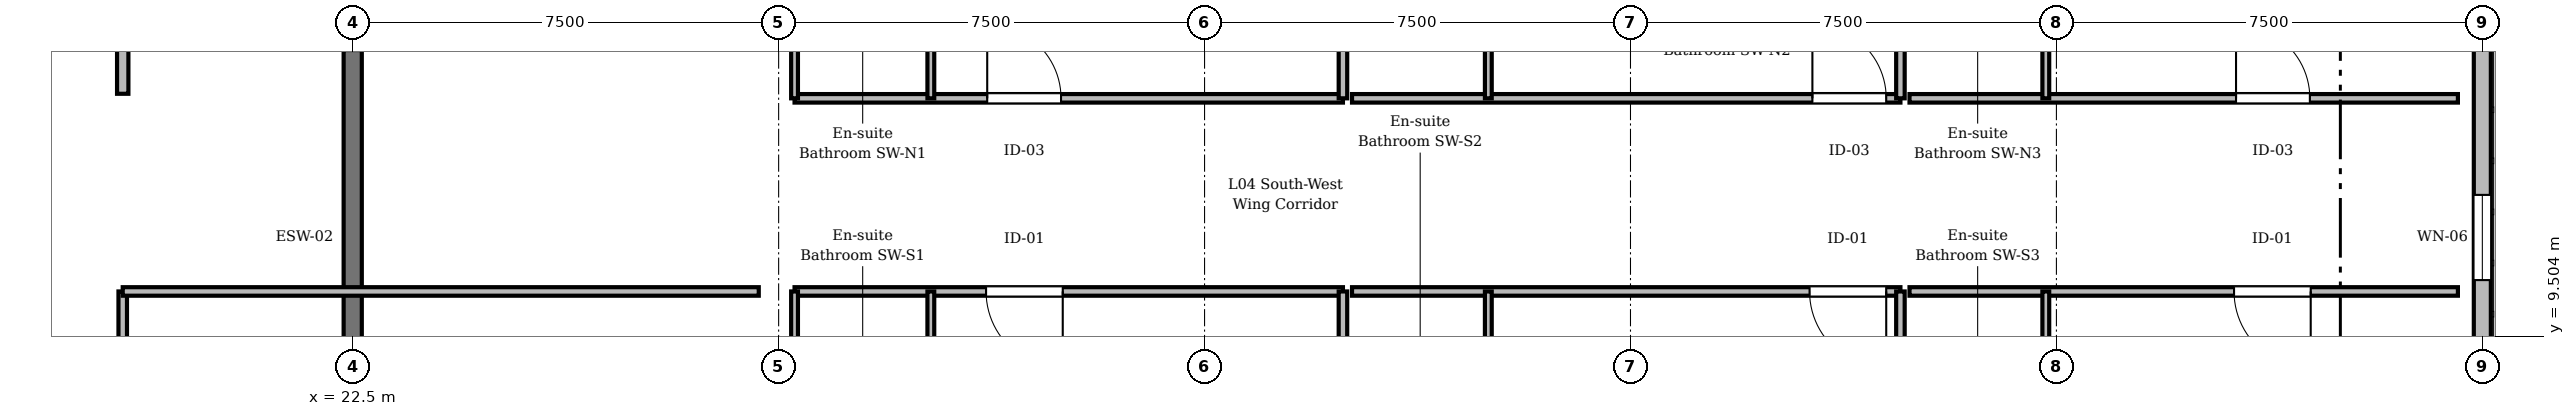
"""IFC4 building model, lengths in metres.
Left out: names, types, materials, properties, quantities, classifications, styles, units other than length and angle.
Written with IfcOpenShell. Run it as: python <this file> out.ifc"""

import sys

from ifc_helpers import new_model, si_unit, direction, frame, frame_2d, origin, place, context, subcontext, project, spatial, rectangle, extrude, element, fill, save


model = new_model("IFC4")
c1 = context("Model", 3, precision=1e-05, world=origin(), true_north=direction((0.0, 1.0)))
c2 = subcontext(c1, "Body", "Model", "MODEL_VIEW")
j1 = project(units=[si_unit("LENGTHUNIT", "METRE"), si_unit("PLANEANGLEUNIT", "RADIAN")], contexts=[c1])
p1 = place(None, origin())
s1 = spatial("IfcSite", under=j1, at=p1, CompositionType="ELEMENT")
p2 = place(p1, origin())
s2 = spatial("IfcBuilding", under=s1, at=p2, CompositionType="ELEMENT")
p3 = place(p2, frame((0.0, 0.0, 17.85)))
s3 = spatial("IfcBuildingStorey", under=s2, at=p3, CompositionType="ELEMENT", Elevation=17.85)
p4 = place(p3, frame((22.5, 7.95, 0.0), z_axis=(0.0, 0.0, 1.0), x_axis=(0.0, 1.0, 0.0)))
e1 = element("IfcWall", 1, at=p4, inside=s3, PredefinedType="SHEAR", context=c2, shape_type="SweptSolid", body=[
    extrude(rectangle(XDim=6.6, YDim=0.32, at=frame_2d((3.3, 0.0))), origin(), (0.0, 0.0, 1.0), 3.22),
])
p5 = place(p3, frame((60.0, 14.765, 0.0), z_axis=(0.0, 0.0, 1.0), x_axis=(0.0, -1.0, 0.0)))
e2 = element("IfcWall", 2, at=p5, inside=s3, PredefinedType="STANDARD", context=c2, shape_type="SweptSolid", body=[
    extrude(rectangle(XDim=7.03, YDim=0.3, at=frame_2d((3.515, 0.0))), origin(), (0.0, 0.0, 1.0), 3.17),
])
p6 = place(p5, frame((2.765, 0.0, 0.9)))
e3 = element("IfcOpeningElement", 3, at=p6, cuts=e2, PredefinedType="OPENING", context=c2, shape_type="SweptSolid", body=[
    extrude(rectangle(XDim=1.5, YDim=1.99, at=frame_2d((0.75, 0.995))), frame((0.0, 0.16, 0.0), z_axis=(0.0, -1.0, 0.0), x_axis=(1.0, 0.0, 0.0)), (0.0, 0.0, 1.0), 0.32),
])
p7 = place(p3, frame((18.45, 10.3, 0.0), z_axis=(0.0, 0.0, 1.0), x_axis=(0.0, -1.0, 0.0)))
e4 = element("IfcWall", 4, at=p7, inside=s3, PredefinedType="PARTITIONING", context=c2, shape_type="SweptSolid", body=[
    extrude(rectangle(XDim=9.95, YDim=0.15, at=frame_2d((4.975, 0.0))), origin(), (0.0, 0.0, 1.0), 3.755),
])
p8 = place(p7, frame((5.92, 0.0, 0.0)))
e5 = element("IfcOpeningElement", 5, at=p8, cuts=e4, PredefinedType="OPENING", context=c2, shape_type="SweptSolid", body=[
    extrude(rectangle(XDim=1.35, YDim=2.25, at=frame_2d((0.675, 1.125))), frame((0.0, 0.085, 0.0), z_axis=(0.0, -1.0, 0.0), x_axis=(1.0, 0.0, 0.0)), (0.0, 0.0, 1.0), 0.17),
])
p9 = place(p3, frame((18.45, 20.797, 0.0), z_axis=(0.0, 0.0, 1.0), x_axis=(0.0, -1.0, 0.0)))
e6 = element("IfcWall", 6, at=p9, inside=s3, PredefinedType="STANDARD", context=c2, shape_type="SweptSolid", body=[
    extrude(rectangle(XDim=7.017, YDim=0.2, at=frame_2d((3.509, 0.0))), origin(), (0.0, 0.0, 1.0), 3.755),
])
p10 = place(p9, frame((1.323, 0.0, 0.0)))
e7 = element("IfcOpeningElement", 7, at=p10, cuts=e6, PredefinedType="OPENING", context=c2, shape_type="SweptSolid", body=[
    extrude(rectangle(XDim=1.15, YDim=2.2, at=frame_2d((0.575, 1.1))), frame((0.0, 0.11, 0.0), z_axis=(0.0, -1.0, 0.0), x_axis=(1.0, 0.0, 0.0)), (0.0, 0.0, 1.0), 0.22),
])
p11 = place(p3, frame((39.937, 10.3, 0.0), z_axis=(0.0, 0.0, 1.0), x_axis=(-1.0, 0.0, 0.0)))
e8 = element("IfcWall", 8, at=p11, inside=s3, PredefinedType="PARTITIONING", context=c2, shape_type="SweptSolid", body=[
    extrude(rectangle(XDim=9.657, YDim=0.15, at=frame_2d((4.828, 0.0))), origin(), (0.0, 0.0, 1.0), 3.755),
])
p12 = place(p11, frame((4.934, 0.0, 0.0)))
e9 = element("IfcOpeningElement", 9, at=p12, cuts=e8, PredefinedType="OPENING", context=c2, shape_type="SweptSolid", body=[
    extrude(rectangle(XDim=1.35, YDim=2.25, at=frame_2d((0.675, 1.125))), frame((0.0, 0.085, 0.0), z_axis=(0.0, -1.0, 0.0), x_axis=(1.0, 0.0, 0.0)), (0.0, 0.0, 1.0), 0.17),
])
p13 = place(p3, frame((32.68, 8.3, 0.0), z_axis=(0.0, 0.0, 1.0), x_axis=(0.0, 1.0, 0.0)))
e10 = element("IfcWall", 10, at=p13, inside=s3, PredefinedType="PARTITIONING", context=c2, shape_type="SweptSolid", body=[
    extrude(rectangle(XDim=2.0, YDim=0.12, at=frame_2d((1.0, 0.0))), origin(), (0.0, 0.0, 1.0), 3.755),
])
p14 = place(p3, frame((30.28, 13.7, 0.0), z_axis=(0.0, 0.0, 1.0), x_axis=(1.0, 0.0, 0.0)))
e11 = element("IfcWall", 11, at=p14, inside=s3, PredefinedType="PARTITIONING", context=c2, shape_type="SweptSolid", body=[
    extrude(rectangle(XDim=9.657, YDim=0.15, at=frame_2d((4.828, 0.0))), origin(), (0.0, 0.0, 1.0), 3.755),
])
p15 = place(p14, frame((3.393, 0.0, 0.0)))
e12 = element("IfcOpeningElement", 12, at=p15, cuts=e11, PredefinedType="OPENING", context=c2, shape_type="SweptSolid", body=[
    extrude(rectangle(XDim=1.3, YDim=2.2, at=frame_2d((0.65, 1.1))), frame((0.0, 0.085, 0.0), z_axis=(0.0, -1.0, 0.0), x_axis=(1.0, 0.0, 0.0)), (0.0, 0.0, 1.0), 0.17),
])
p16 = place(p3, frame((32.68, 13.7, 0.0), z_axis=(0.0, 0.0, 1.0), x_axis=(0.0, 1.0, 0.0)))
e13 = element("IfcWall", 13, at=p16, inside=s3, PredefinedType="PARTITIONING", context=c2, shape_type="SweptSolid", body=[
    extrude(rectangle(XDim=2.0, YDim=0.12, at=frame_2d((1.0, 0.0))), origin(), (0.0, 0.0, 1.0), 3.755),
])
p17 = place(p3, frame((49.753, 10.3, 0.0), z_axis=(0.0, 0.0, 1.0), x_axis=(-1.0, 0.0, 0.0)))
e14 = element("IfcWall", 14, at=p17, inside=s3, PredefinedType="PARTITIONING", context=c2, shape_type="SweptSolid", body=[
    extrude(rectangle(XDim=9.657, YDim=0.15, at=frame_2d((4.828, 0.0))), origin(), (0.0, 0.0, 1.0), 3.755),
])
p18 = place(p17, frame((0.25, 0.0, 0.0)))
e15 = element("IfcOpeningElement", 15, at=p18, cuts=e14, PredefinedType="OPENING", context=c2, shape_type="SweptSolid", body=[
    extrude(rectangle(XDim=1.35, YDim=2.25, at=frame_2d((0.675, 1.125))), frame((0.0, 0.085, 0.0), z_axis=(0.0, -1.0, 0.0), x_axis=(1.0, 0.0, 0.0)), (0.0, 0.0, 1.0), 0.17),
])
p19 = place(p3, frame((42.497, 8.3, 0.0), z_axis=(0.0, 0.0, 1.0), x_axis=(0.0, 1.0, 0.0)))
e16 = element("IfcWall", 16, at=p19, inside=s3, PredefinedType="PARTITIONING", context=c2, shape_type="SweptSolid", body=[
    extrude(rectangle(XDim=2.0, YDim=0.12, at=frame_2d((1.0, 0.0))), origin(), (0.0, 0.0, 1.0), 3.755),
])
p20 = place(p3, frame((40.097, 13.7, 0.0), z_axis=(0.0, 0.0, 1.0), x_axis=(1.0, 0.0, 0.0)))
e17 = element("IfcWall", 17, at=p20, inside=s3, PredefinedType="PARTITIONING", context=c2, shape_type="SweptSolid", body=[
    extrude(rectangle(XDim=9.657, YDim=0.15, at=frame_2d((4.828, 0.0))), origin(), (0.0, 0.0, 1.0), 3.755),
])
p21 = place(p20, frame((8.107, 0.0, 0.0)))
e18 = element("IfcOpeningElement", 18, at=p21, cuts=e17, PredefinedType="OPENING", context=c2, shape_type="SweptSolid", body=[
    extrude(rectangle(XDim=1.3, YDim=2.2, at=frame_2d((0.65, 1.1))), frame((0.0, 0.085, 0.0), z_axis=(0.0, -1.0, 0.0), x_axis=(1.0, 0.0, 0.0)), (0.0, 0.0, 1.0), 0.17),
])
p22 = place(p3, frame((42.497, 13.7, 0.0), z_axis=(0.0, 0.0, 1.0), x_axis=(0.0, 1.0, 0.0)))
e19 = element("IfcWall", 19, at=p22, inside=s3, PredefinedType="PARTITIONING", context=c2, shape_type="SweptSolid", body=[
    extrude(rectangle(XDim=2.0, YDim=0.12, at=frame_2d((1.0, 0.0))), origin(), (0.0, 0.0, 1.0), 3.755),
])
p23 = place(p3, frame((59.57, 10.3, 0.0), z_axis=(0.0, 0.0, 1.0), x_axis=(-1.0, 0.0, 0.0)))
e20 = element("IfcWall", 20, at=p23, inside=s3, PredefinedType="PARTITIONING", context=c2, shape_type="SweptSolid", body=[
    extrude(rectangle(XDim=9.657, YDim=0.15, at=frame_2d((4.828, 0.0))), origin(), (0.0, 0.0, 1.0), 3.755),
])
p24 = place(p23, frame((2.592, 0.0, 0.0)))
e21 = element("IfcOpeningElement", 21, at=p24, cuts=e20, PredefinedType="OPENING", context=c2, shape_type="SweptSolid", body=[
    extrude(rectangle(XDim=1.35, YDim=2.25, at=frame_2d((0.675, 1.125))), frame((0.0, 0.085, 0.0), z_axis=(0.0, -1.0, 0.0), x_axis=(1.0, 0.0, 0.0)), (0.0, 0.0, 1.0), 0.17),
])
p25 = place(p3, frame((52.313, 8.3, 0.0), z_axis=(0.0, 0.0, 1.0), x_axis=(0.0, 1.0, 0.0)))
e22 = element("IfcWall", 22, at=p25, inside=s3, PredefinedType="PARTITIONING", context=c2, shape_type="SweptSolid", body=[
    extrude(rectangle(XDim=2.0, YDim=0.12, at=frame_2d((1.0, 0.0))), origin(), (0.0, 0.0, 1.0), 3.205),
])
p26 = place(p3, frame((49.913, 13.7, 0.0), z_axis=(0.0, 0.0, 1.0), x_axis=(1.0, 0.0, 0.0)))
e23 = element("IfcWall", 23, at=p26, inside=s3, PredefinedType="PARTITIONING", context=c2, shape_type="SweptSolid", body=[
    extrude(rectangle(XDim=9.657, YDim=0.15, at=frame_2d((4.828, 0.0))), origin(), (0.0, 0.0, 1.0), 3.755),
])
p27 = place(p26, frame((5.75, 0.0, 0.0)))
e24 = element("IfcOpeningElement", 24, at=p27, cuts=e23, PredefinedType="OPENING", context=c2, shape_type="SweptSolid", body=[
    extrude(rectangle(XDim=1.3, YDim=2.2, at=frame_2d((0.65, 1.1))), frame((0.0, 0.085, 0.0), z_axis=(0.0, -1.0, 0.0), x_axis=(1.0, 0.0, 0.0)), (0.0, 0.0, 1.0), 0.17),
])
p28 = place(p3, frame((52.313, 13.7, 0.0), z_axis=(0.0, 0.0, 1.0), x_axis=(0.0, 1.0, 0.0)))
e25 = element("IfcWall", 25, at=p28, inside=s3, PredefinedType="PARTITIONING", context=c2, shape_type="SweptSolid", body=[
    extrude(rectangle(XDim=2.0, YDim=0.12, at=frame_2d((1.0, 0.0))), origin(), (0.0, 0.0, 1.0), 3.205),
])
p29 = place(p3, frame((18.45, 10.3, 0.0), z_axis=(0.0, 0.0, 1.0), x_axis=(1.0, 0.0, 0.0)))
e26 = element("IfcWall", 26, at=p29, inside=s3, PredefinedType="PARTITIONING", context=c2, shape_type="SweptSolid", body=[
    extrude(rectangle(XDim=11.2, YDim=0.15, at=frame_2d((5.6, 0.0))), origin(), (0.0, 0.0, 1.0), 3.755),
])
p30 = place(p3, frame((39.937, 0.35, 0.0), z_axis=(0.0, 0.0, 1.0), x_axis=(0.0, 1.0, 0.0)))
e27 = element("IfcWall", 27, at=p30, inside=s3, PredefinedType="PARTITIONING", context=c2, shape_type="SweptSolid", body=[
    extrude(rectangle(XDim=9.95, YDim=0.15, at=frame_2d((4.975, 0.0))), origin(), (0.0, 0.0, 1.0), 3.755),
])
p31 = place(p3, frame((39.937, 13.7, 0.0), z_axis=(0.0, 0.0, 1.0), x_axis=(0.0, 1.0, 0.0)))
e28 = element("IfcWall", 28, at=p31, inside=s3, PredefinedType="PARTITIONING", context=c2, shape_type="SweptSolid", body=[
    extrude(rectangle(XDim=8.45, YDim=0.15, at=frame_2d((4.225, 0.0))), origin(), (0.0, 0.0, 1.0), 3.755),
])
p32 = place(p3, frame((49.753, 0.35, 0.0), z_axis=(0.0, 0.0, 1.0), x_axis=(0.0, 1.0, 0.0)))
e29 = element("IfcWall", 29, at=p32, inside=s3, PredefinedType="PARTITIONING", context=c2, shape_type="SweptSolid", body=[
    extrude(rectangle(XDim=9.95, YDim=0.15, at=frame_2d((4.975, 0.0))), origin(), (0.0, 0.0, 1.0), 3.755),
])
p33 = place(p3, frame((49.753, 13.7, 0.0), z_axis=(0.0, 0.0, 1.0), x_axis=(0.0, 1.0, 0.0)))
e30 = element("IfcWall", 30, at=p33, inside=s3, PredefinedType="PARTITIONING", context=c2, shape_type="SweptSolid", body=[
    extrude(rectangle(XDim=8.45, YDim=0.15, at=frame_2d((4.225, 0.0))), origin(), (0.0, 0.0, 1.0), 3.755),
])
p34 = place(p3, frame((30.28, 8.3, 0.0), z_axis=(0.0, 0.0, 1.0), x_axis=(0.0, 1.0, 0.0)))
e31 = element("IfcWall", 31, at=p34, inside=s3, PredefinedType="PARTITIONING", context=c2, shape_type="SweptSolid", body=[
    extrude(rectangle(XDim=2.0, YDim=0.12, at=frame_2d((1.0, 0.0))), origin(), (0.0, 0.0, 1.0), 3.255),
])
p35 = place(p3, frame((30.28, 13.7, 0.0), z_axis=(0.0, 0.0, 1.0), x_axis=(0.0, 1.0, 0.0)))
e32 = element("IfcWall", 32, at=p35, inside=s3, PredefinedType="PARTITIONING", context=c2, shape_type="SweptSolid", body=[
    extrude(rectangle(XDim=2.0, YDim=0.12, at=frame_2d((1.0, 0.0))), origin(), (0.0, 0.0, 1.0), 3.205),
])
p36 = place(p6, origin())
e33 = element("IfcWindow", 33, at=p36, inside=s3, PartitioningType="SINGLE_PANEL", PredefinedType="WINDOW", context=c2, shape_type="SweptSolid", body=[
    extrude(rectangle(XDim=1.5, YDim=1.99, at=frame_2d((0.75, 0.995))), frame((0.0, 0.03, 0.0), z_axis=(0.0, -1.0, 0.0), x_axis=(1.0, 0.0, 0.0)), (0.0, 0.0, 1.0), 0.06),
])
fill(e3, e33)
p37 = place(p12, origin())
e34 = element("IfcDoor", 34, at=p37, inside=s3, OperationType="SINGLE_SWING_LEFT", PredefinedType="DOOR", context=c2, shape_type="SweptSolid", body=[
    extrude(rectangle(XDim=1.35, YDim=2.25, at=frame_2d((0.675, 1.125))), frame((0.0, 0.025, 0.0), z_axis=(0.0, -1.0, 0.0), x_axis=(1.0, 0.0, 0.0)), (0.0, 0.0, 1.0), 0.05),
])
fill(e9, e34)
p38 = place(p15, origin())
e35 = element("IfcDoor", 35, at=p38, inside=s3, OperationType="SINGLE_SWING_LEFT", PredefinedType="DOOR", context=c2, shape_type="SweptSolid", body=[
    extrude(rectangle(XDim=1.3, YDim=2.2, at=frame_2d((0.65, 1.1))), frame((0.0, 0.025, 0.0), z_axis=(0.0, -1.0, 0.0), x_axis=(1.0, 0.0, 0.0)), (0.0, 0.0, 1.0), 0.05),
])
fill(e12, e35)
p39 = place(p18, origin())
e36 = element("IfcDoor", 36, at=p39, inside=s3, OperationType="SINGLE_SWING_LEFT", PredefinedType="DOOR", context=c2, shape_type="SweptSolid", body=[
    extrude(rectangle(XDim=1.35, YDim=2.25, at=frame_2d((0.675, 1.125))), frame((0.0, 0.025, 0.0), z_axis=(0.0, -1.0, 0.0), x_axis=(1.0, 0.0, 0.0)), (0.0, 0.0, 1.0), 0.05),
])
fill(e15, e36)
p40 = place(p21, origin())
e37 = element("IfcDoor", 37, at=p40, inside=s3, OperationType="SINGLE_SWING_LEFT", PredefinedType="DOOR", context=c2, shape_type="SweptSolid", body=[
    extrude(rectangle(XDim=1.3, YDim=2.2, at=frame_2d((0.65, 1.1))), frame((0.0, 0.025, 0.0), z_axis=(0.0, -1.0, 0.0), x_axis=(1.0, 0.0, 0.0)), (0.0, 0.0, 1.0), 0.05),
])
fill(e18, e37)
p41 = place(p24, origin())
e38 = element("IfcDoor", 38, at=p41, inside=s3, OperationType="SINGLE_SWING_LEFT", PredefinedType="DOOR", context=c2, shape_type="SweptSolid", body=[
    extrude(rectangle(XDim=1.35, YDim=2.25, at=frame_2d((0.675, 1.125))), frame((0.0, 0.025, 0.0), z_axis=(0.0, -1.0, 0.0), x_axis=(1.0, 0.0, 0.0)), (0.0, 0.0, 1.0), 0.05),
])
fill(e21, e38)
p42 = place(p27, origin())
e39 = element("IfcDoor", 39, at=p42, inside=s3, OperationType="SINGLE_SWING_LEFT", PredefinedType="DOOR", context=c2, shape_type="SweptSolid", body=[
    extrude(rectangle(XDim=1.3, YDim=2.2, at=frame_2d((0.65, 1.1))), frame((0.0, 0.025, 0.0), z_axis=(0.0, -1.0, 0.0), x_axis=(1.0, 0.0, 0.0)), (0.0, 0.0, 1.0), 0.05),
])
fill(e24, e39)
save(model, sys.argv[1])
